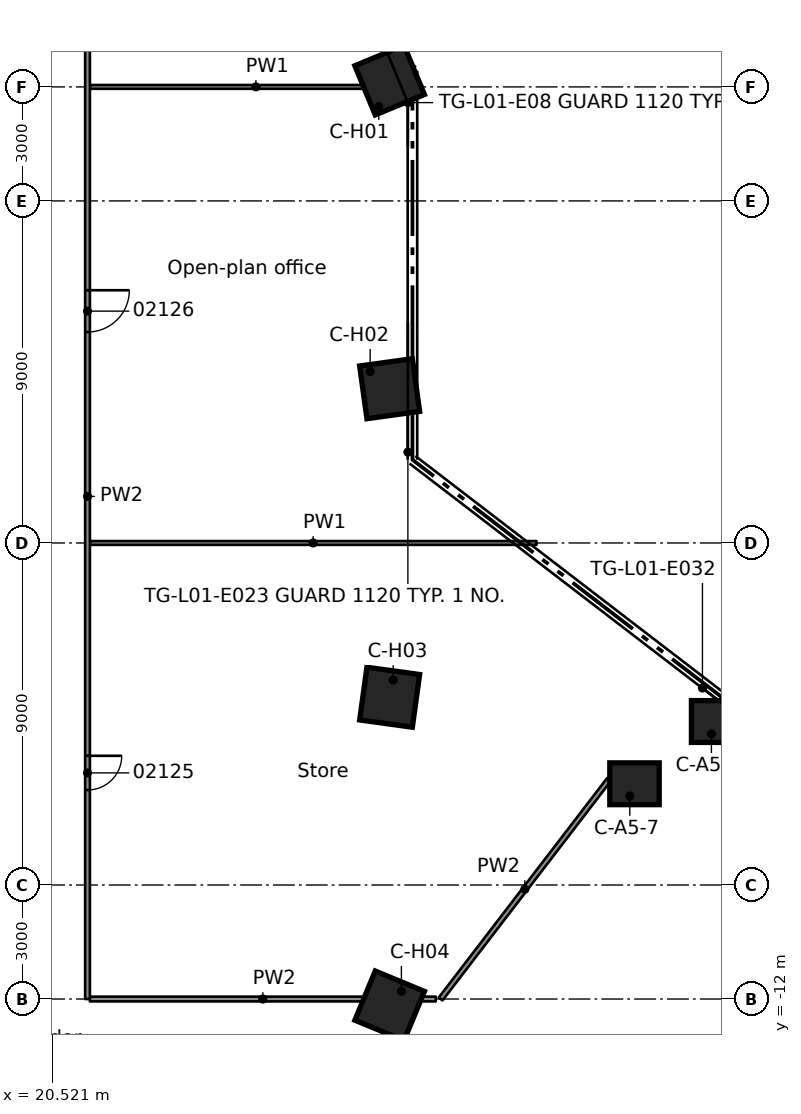
"""IFC4 building model, lengths in metres.
Left out: names, types, materials, properties, quantities, classifications, styles, units other than length and angle.
Written with IfcOpenShell. Run it as: python <this file> out.ifc"""

import sys

from ifc_helpers import new_model, si_unit, direction, frame, frame_2d, origin, origin_2d, place, context, subcontext, project, spatial, rectangle, extrude, element, fill, save


model = new_model("IFC4")
c1 = context("Model", 3, precision=1e-05, world=origin(), true_north=direction((0.0, 1.0)))
c2 = subcontext(c1, "Body", "Model", "MODEL_VIEW")
j1 = project(units=[si_unit("LENGTHUNIT", "METRE"), si_unit("PLANEANGLEUNIT", "RADIAN")], contexts=[c1])
p1 = place(None, origin())
s1 = spatial("IfcSite", under=j1, at=p1, CompositionType="ELEMENT")
p2 = place(p1, origin())
s2 = spatial("IfcBuilding", under=s1, at=p2, CompositionType="ELEMENT")
p3 = place(p2, frame((0.0, 0.0, 10.5)))
s3 = spatial("IfcBuildingStorey", under=s2, at=p3, CompositionType="ELEMENT", Elevation=10.5)
p4 = place(p3, frame((37.991, -4.698, -1.0), z_axis=(0.0, 0.0, 1.0), x_axis=(0.707106781187, 0.707106781187, 0.0)))
e1 = element("IfcColumn", 1, at=p4, inside=s3, PredefinedType="COLUMN", context=c2, shape_type="SweptSolid", body=[
    extrude(rectangle(XDim=2.6, YDim=2.6, at=origin_2d()), origin(), (0.0, 0.0, 1.0), 1.0),
])
p5 = place(p3, frame((39.81, -9.38, -1.0), z_axis=(0.0, 0.0, 1.0), x_axis=(0.707106781187, 0.707106781187, 0.0)))
e2 = element("IfcColumn", 2, at=p5, inside=s3, PredefinedType="COLUMN", context=c2, shape_type="SweptSolid", body=[
    extrude(rectangle(XDim=3.4, YDim=3.4, at=origin_2d()), origin(), (0.0, 0.0, 1.0), 1.0),
])
p6 = place(p3, frame((35.843, -6.336, -1.0), z_axis=(0.0, 0.0, 1.0), x_axis=(0.707106781187, 0.707106781187, 0.0)))
e3 = element("IfcColumn", 3, at=p6, inside=s3, PredefinedType="COLUMN", context=c2, shape_type="SweptSolid", body=[
    extrude(rectangle(XDim=2.6, YDim=2.6, at=origin_2d()), origin(), (0.0, 0.0, 1.0), 1.0),
])
for number, where, z_axis, x_axis in (
    (4, (29.4, 12.178, -1.0), (0.0, 0.0, 1.0), (0.707, 0.707, 0.0)),
    (5, (29.4, 4.059, -1.0), (0.0, 0.0, 1.0), (0.707, 0.707, 0.0)),
    (6, (29.4, -4.059, -1.0), (0.0, 0.0, 1.0), (0.707, 0.707, 0.0)),
    (7, (29.4, -12.178, -1.0), (0.0, 0.0, 1.0), (0.707, 0.707, 0.0)),
):
    element("IfcColumn", number, at=place(p3, frame(where, z_axis=z_axis, x_axis=x_axis)), inside=s3, PredefinedType="COLUMN", context=c2, shape_type="SweptSolid", body=[
        extrude(rectangle(XDim=3.4, YDim=3.4, at=origin_2d()), origin(), (0.0, 0.0, 1.0), 1.0),
    ])
for number, where, z_axis, x_axis in (
    (8, (37.991, -4.698, 0.0), (0.0, 0.0, 1.0), (1.0, 0.0, 0.0)),
    (9, (35.843, -6.336, 0.0), (0.0, 0.0, 1.0), (1.0, 0.0, 0.0)),
):
    element("IfcColumn", number, at=place(p3, frame(where, z_axis=z_axis, x_axis=x_axis)), inside=s3, PredefinedType="COLUMN", context=c2, shape_type="SweptSolid", body=[
        extrude(rectangle(XDim=1.3, YDim=1.1, at=origin_2d()), origin(), (0.0, 0.0, 1.0), 5.0),
    ])
for number, where, z_axis, x_axis in (
    (10, (29.4, 12.178, 0.0), (0.0, 0.0, 1.0), (0.924, 0.383, 0.0)),
    (11, (29.4, 4.059, 0.0), (0.0, 0.0, 1.0), (0.991, 0.137, 0.0)),
    (12, (29.4, -4.059, 0.0), (0.0, 0.0, 1.0), (0.991, -0.137, 0.0)),
    (13, (29.4, -12.178, 0.0), (0.0, 0.0, 1.0), (0.924, -0.383, 0.0)),
):
    element("IfcColumn", number, at=place(p3, frame(where, z_axis=z_axis, x_axis=x_axis)), inside=s3, PredefinedType="COLUMN", context=c2, shape_type="SweptSolid", body=[
        extrude(rectangle(XDim=1.4, YDim=1.4, at=origin_2d()), origin(), (0.0, 0.0, 1.0), 5.0),
    ])
p7 = place(p3, frame((21.512, -12.0, 0.0), z_axis=(0.0, 0.0, 1.0), x_axis=(1.0, 0.0, 0.0)))
e14 = element("IfcWall", 14, at=p7, inside=s3, PredefinedType="PARTITIONING", context=c2, shape_type="SweptSolid", body=[
    extrude(rectangle(XDim=9.102, YDim=0.125, at=frame_2d((4.551, 0.0))), origin(), (0.0, 0.0, 1.0), 4.58),
])
p8 = place(p3, frame((21.512, 0.0, 0.0), z_axis=(0.0, 0.0, 1.0), x_axis=(1.0, 0.0, 0.0)))
e15 = element("IfcWall", 15, at=p8, inside=s3, PredefinedType="PARTITIONING", context=c2, shape_type="SweptSolid", body=[
    extrude(rectangle(XDim=11.752, YDim=0.1, at=frame_2d((5.876, 0.0))), origin(), (0.0, 0.0, 1.0), 4.58),
])
p9 = place(p3, frame((21.512, 12.0, 0.0), z_axis=(0.0, 0.0, 1.0), x_axis=(1.0, 0.0, 0.0)))
e16 = element("IfcWall", 16, at=p9, inside=s3, PredefinedType="PARTITIONING", context=c2, shape_type="SweptSolid", body=[
    extrude(rectangle(XDim=8.738, YDim=0.1, at=frame_2d((4.369, 0.0))), origin(), (0.0, 0.0, 1.0), 4.58),
])
p10 = place(p3, frame((30.741, -12.0, 0.0), z_axis=(0.0, 0.0, 1.0), x_axis=(0.608773631009, 0.793343977218, 0.0)))
e17 = element("IfcWall", 17, at=p10, inside=s3, PredefinedType="PARTITIONING", context=c2, shape_type="SweptSolid", body=[
    extrude(rectangle(XDim=7.281, YDim=0.125, at=frame_2d((3.64, 0.0))), origin(), (0.0, 0.0, 1.0), 4.58),
])
p11 = place(p3, frame((21.45, 14.451, 0.0), z_axis=(0.0, 0.0, 1.0), x_axis=(0.0, -1.0, 0.0)))
e18 = element("IfcWall", 18, at=p11, inside=s3, PredefinedType="PARTITIONING", context=c2, shape_type="SweptSolid", body=[
    extrude(rectangle(XDim=26.451, YDim=0.125, at=frame_2d((13.226, 0.0))), origin(), (0.0, 0.0, 1.0), 4.58),
])
p12 = place(p11, frame((20.051, 0.0, 0.0)))
e19 = element("IfcOpeningElement", 19, at=p12, cuts=e18, PredefinedType="OPENING", context=c2, shape_type="SweptSolid", body=[
    extrude(rectangle(XDim=0.9, YDim=2.1, at=frame_2d((0.45, 1.05))), frame((0.0, 0.073, 0.0), z_axis=(0.0, -1.0, 0.0), x_axis=(1.0, 0.0, 0.0)), (0.0, 0.0, 1.0), 0.145),
])
p13 = place(p11, frame((7.801, 0.0, 0.0)))
e20 = element("IfcOpeningElement", 20, at=p13, cuts=e18, PredefinedType="OPENING", context=c2, shape_type="SweptSolid", body=[
    extrude(rectangle(XDim=1.1, YDim=2.1, at=frame_2d((0.55, 1.05))), frame((0.0, 0.073, 0.0), z_axis=(0.0, -1.0, 0.0), x_axis=(1.0, 0.0, 0.0)), (0.0, 0.0, 1.0), 0.145),
])
p14 = place(p12, origin())
e21 = element("IfcDoor", 21, at=p14, inside=s3, OperationType="SINGLE_SWING_RIGHT", PredefinedType="DOOR", context=c2, shape_type="SweptSolid", body=[
    extrude(rectangle(XDim=0.9, YDim=2.1, at=frame_2d((0.45, 1.05))), frame((0.0, 0.025, 0.0), z_axis=(0.0, -1.0, 0.0), x_axis=(1.0, 0.0, 0.0)), (0.0, 0.0, 1.0), 0.05),
])
fill(e19, e21)
p15 = place(p13, origin())
e22 = element("IfcDoor", 22, at=p15, inside=s3, OperationType="SINGLE_SWING_LEFT", PredefinedType="DOOR", context=c2, shape_type="SweptSolid", body=[
    extrude(rectangle(XDim=1.1, YDim=2.1, at=frame_2d((0.55, 1.05))), frame((0.0, 0.025, 0.0), z_axis=(0.0, -1.0, 0.0), x_axis=(1.0, 0.0, 0.0)), (0.0, 0.0, 1.0), 0.05),
])
fill(e20, e22)
save(model, sys.argv[1])
